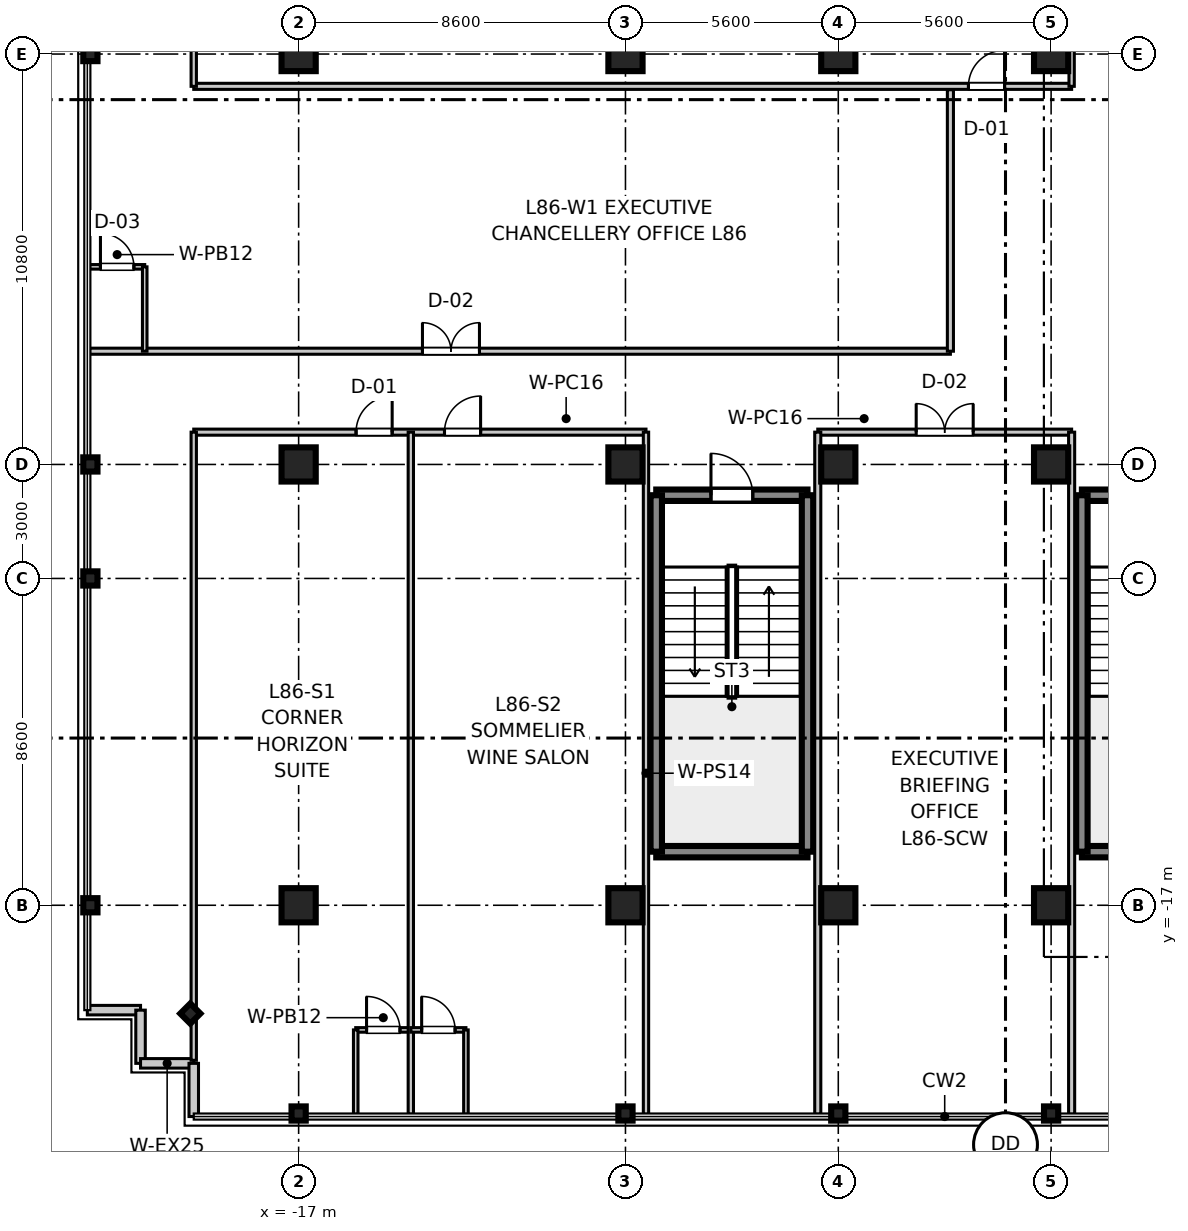
"""IFC4 building model, lengths in metres.
Left out: names, types, materials, properties, quantities, classifications, styles, units other than length and angle.
Written with IfcOpenShell. Run it as: python <this file> out.ifc"""

import sys

from ifc_helpers import new_model, si_unit, direction, frame, frame_2d, origin, origin_2d, place, context, subcontext, project, spatial, rectangle, i_section, extrude, source, transform, mapped, element, fill, save


model = new_model("IFC4")
c1 = context("Model", 3, precision=1e-05, world=origin(), true_north=direction((0.0, 1.0)))
c2 = subcontext(c1, "Body", "Model", "MODEL_VIEW")
j1 = project(units=[si_unit("LENGTHUNIT", "METRE"), si_unit("PLANEANGLEUNIT", "RADIAN")], contexts=[c1])
p1 = place(None, origin())
s1 = spatial("IfcSite", under=j1, at=p1, CompositionType="ELEMENT")
p2 = place(p1, origin())
s2 = spatial("IfcBuilding", under=s1, at=p2, CompositionType="ELEMENT")
p3 = place(p2, frame((0.0, 0.0, 334.75)))
s3 = spatial("IfcBuildingStorey", under=s2, at=p3, CompositionType="ELEMENT", Elevation=334.75)
m1 = source(origin(), c2, "Body", "SweptSolid", [
    extrude(rectangle(XDim=0.9, YDim=0.9, at=origin_2d()), origin(), (0.0, 0.0, 1.0), 3.755),
])
for number, where, z_axis, x_axis in (
    (1, (-17.0, -17.0, 0.0), (0.0, 0.0, 1.0), (1.0, 0.0, 0.0)),
    (2, (-17.0, -5.4, 0.0), (0.0, 0.0, 1.0), (1.0, 0.0, 0.0)),
    (3, (-17.0, 5.4, 0.0), (0.0, 0.0, 1.0), (1.0, 0.0, 0.0)),
    (4, (-8.4, -17.0, 0.0), (0.0, 0.0, 1.0), (1.0, 0.0, 0.0)),
    (5, (-8.4, -5.4, 0.0), (0.0, 0.0, 1.0), (1.0, 0.0, 0.0)),
    (6, (-8.4, 5.4, 0.0), (0.0, 0.0, 1.0), (1.0, 0.0, 0.0)),
    (7, (-2.8, -17.0, 0.0), (0.0, 0.0, 1.0), (1.0, 0.0, 0.0)),
    (8, (-2.8, -5.4, 0.0), (0.0, 0.0, 1.0), (1.0, 0.0, 0.0)),
    (9, (-2.8, 5.4, 0.0), (0.0, 0.0, 1.0), (1.0, 0.0, 0.0)),
    (10, (2.8, -17.0, 0.0), (0.0, 0.0, 1.0), (1.0, 0.0, 0.0)),
    (11, (2.8, -5.4, 0.0), (0.0, 0.0, 1.0), (1.0, 0.0, 0.0)),
    (12, (2.8, 5.4, 0.0), (0.0, 0.0, 1.0), (1.0, 0.0, 0.0)),
):
    element("IfcColumn", number, at=place(p3, frame(where, z_axis=z_axis, x_axis=x_axis)), inside=s3, PredefinedType="COLUMN", context=c2, shape_type="MappedRepresentation", body=[
        mapped(m1, transform((0.0, 0.0, 0.0), scale=1.0)),
    ])
m2 = source(origin(), c2, "Body", "SweptSolid", [
    extrude(i_section(OverallWidth=0.374, OverallDepth=0.374, WebThickness=0.014, FlangeThickness=0.023, at=origin_2d()), origin(), (0.0, 0.0, 1.0), 3.755),
])
for number, where, z_axis, x_axis in (
    (13, (-22.48, -17.0, 0.0), (0.0, 0.0, 1.0), (1.0, 0.0, 0.0)),
    (14, (-22.48, -8.4, 0.0), (0.0, 0.0, 1.0), (1.0, 0.0, 0.0)),
    (15, (-22.48, -5.4, 0.0), (0.0, 0.0, 1.0), (1.0, 0.0, 0.0)),
    (16, (-22.48, 5.4, 0.0), (0.0, 0.0, 1.0), (1.0, 0.0, 0.0)),
    (17, (-17.0, -22.48, 0.0), (0.0, 0.0, 1.0), (0.0, 1.0, 0.0)),
    (18, (-8.4, -22.48, 0.0), (0.0, 0.0, 1.0), (0.0, 1.0, 0.0)),
    (19, (-2.8, -22.48, 0.0), (0.0, 0.0, 1.0), (0.0, 1.0, 0.0)),
    (20, (2.8, -22.48, 0.0), (0.0, 0.0, 1.0), (0.0, 1.0, 0.0)),
    (21, (-19.85, -19.85, 0.0), (0.0, 0.0, 1.0), (0.707, 0.707, 0.0)),
):
    element("IfcColumn", number, at=place(p3, frame(where, z_axis=z_axis, x_axis=x_axis)), inside=s3, PredefinedType="COLUMN", context=c2, shape_type="MappedRepresentation", body=[
        mapped(m2, transform((0.0, 0.0, 0.0), scale=1.0)),
    ])
m3 = source(origin(), c2, "Body", "SweptSolid", [
    extrude(rectangle(XDim=3.98, YDim=0.3, at=frame_2d((1.99, 0.0))), origin(), (0.0, 0.0, 1.0), 3.47),
])
for number, where, z_axis, x_axis in (
    (22, (3.61, -15.59, 0.0), (0.0, 0.0, 1.0), (1.0, 0.0, 0.0)),
    (23, (3.61, -6.21, 0.0), (0.0, 0.0, 1.0), (1.0, 0.0, 0.0)),
):
    element("IfcWall", number, at=place(p3, frame(where, z_axis=z_axis, x_axis=x_axis)), inside=s3, PredefinedType="SHEAR", context=c2, shape_type="MappedRepresentation", body=[
        mapped(m3, transform((0.0, 0.0, 0.0), scale=1.0)),
    ])
m4 = source(origin(), c2, "Body", "SweptSolid", [
    extrude(rectangle(XDim=9.38, YDim=0.3, at=frame_2d((4.69, 0.0))), origin(), (0.0, 0.0, 1.0), 3.47),
])
p4 = place(p3, frame((3.61, -15.59, 0.0), z_axis=(0.0, 0.0, 1.0), x_axis=(0.0, 1.0, 0.0)))
e24 = element("IfcWall", 24, at=p4, inside=s3, PredefinedType="SHEAR", context=c2, shape_type="MappedRepresentation", body=[
    mapped(m4, transform((0.0, 0.0, 0.0), scale=1.0)),
])
p5 = place(p3, frame((-7.59, -15.59, 0.0), z_axis=(0.0, 0.0, 1.0), x_axis=(1.0, 0.0, 0.0)))
e25 = element("IfcWall", 25, at=p5, inside=s3, PredefinedType="SHEAR", context=c2, shape_type="MappedRepresentation", body=[
    mapped(m3, transform((0.0, 0.0, 0.0), scale=1.0)),
])
p6 = place(p3, frame((-7.59, -6.21, 0.0), z_axis=(0.0, 0.0, 1.0), x_axis=(1.0, 0.0, 0.0)))
e26 = element("IfcWall", 26, at=p6, inside=s3, PredefinedType="SHEAR", context=c2, shape_type="MappedRepresentation", body=[
    mapped(m3, transform((0.0, 0.0, 0.0), scale=1.0)),
])
p7 = place(p6, frame((1.44, 0.0, 0.0)))
e27 = element("IfcOpeningElement", 27, at=p7, cuts=e26, PredefinedType="OPENING", context=c2, shape_type="SweptSolid", body=[
    extrude(rectangle(XDim=1.1, YDim=2.15, at=frame_2d((0.55, 1.075))), frame((0.0, 0.16, 0.0), z_axis=(0.0, -1.0, 0.0), x_axis=(1.0, 0.0, 0.0)), (0.0, 0.0, 1.0), 0.32),
])
for number, where, z_axis, x_axis in (
    (28, (-7.59, -15.59, 0.0), (0.0, 0.0, 1.0), (0.0, 1.0, 0.0)),
    (29, (-3.61, -15.59, 0.0), (0.0, 0.0, 1.0), (0.0, 1.0, 0.0)),
):
    element("IfcWall", number, at=place(p3, frame(where, z_axis=z_axis, x_axis=x_axis)), inside=s3, PredefinedType="SHEAR", context=c2, shape_type="MappedRepresentation", body=[
        mapped(m4, transform((0.0, 0.0, 0.0), scale=1.0)),
    ])
m5 = source(origin(), c2, "Body", "SweptSolid", [
    extrude(rectangle(XDim=1.4, YDim=0.25, at=frame_2d((0.7, 0.0))), origin(), (0.0, 0.0, 1.0), 3.47),
])
p8 = place(p3, frame((-22.56, -19.76, 0.0), z_axis=(0.0, 0.0, 1.0), x_axis=(1.0, 0.0, 0.0)))
e30 = element("IfcWall", 30, at=p8, inside=s3, PredefinedType="STANDARD", context=c2, shape_type="MappedRepresentation", body=[
    mapped(m5, transform((0.0, 0.0, 0.0), scale=1.0)),
])
m6 = source(origin(), c2, "Body", "SweptSolid", [
    extrude(rectangle(XDim=1.4, YDim=0.25, at=frame_2d((0.7, 0.0))), origin(), (0.0, 0.0, 1.0), 3.47),
])
for number, where, z_axis, x_axis in (
    (31, (-21.16, -21.16, 0.0), (0.0, 0.0, 1.0), (0.0, 1.0, 0.0)),
    (32, (-21.16, -21.16, 0.0), (0.0, 0.0, 1.0), (1.0, 0.0, 0.0)),
):
    element("IfcWall", number, at=place(p3, frame(where, z_axis=z_axis, x_axis=x_axis)), inside=s3, PredefinedType="STANDARD", context=c2, shape_type="MappedRepresentation", body=[
        mapped(m6, transform((0.0, 0.0, 0.0), scale=1.0)),
    ])
p9 = place(p3, frame((-19.76, -22.56, 0.0), z_axis=(0.0, 0.0, 1.0), x_axis=(0.0, 1.0, 0.0)))
e33 = element("IfcWall", 33, at=p9, inside=s3, PredefinedType="STANDARD", context=c2, shape_type="MappedRepresentation", body=[
    mapped(m5, transform((0.0, 0.0, 0.0), scale=1.0)),
])
m7 = source(origin(), c2, "Body", "SweptSolid", [
    extrude(rectangle(XDim=23.1, YDim=0.16, at=frame_2d((11.55, 0.0))), origin(), (0.0, 0.0, 1.0), 2.81),
])
p10 = place(p3, frame((-19.76, 4.55, 0.0), z_axis=(0.0, 0.0, 1.0), x_axis=(1.0, 0.0, 0.0)))
e34 = element("IfcWall", 34, at=p10, inside=s3, PredefinedType="PARTITIONING", context=c2, shape_type="MappedRepresentation", body=[
    mapped(m7, transform((0.0, 0.0, 0.0), scale=1.0)),
])
p11 = place(p10, frame((20.385, 0.0, 0.0)))
e35 = element("IfcOpeningElement", 35, at=p11, cuts=e34, PredefinedType="OPENING", context=c2, shape_type="SweptSolid", body=[
    extrude(rectangle(XDim=0.95, YDim=2.1, at=frame_2d((0.475, 1.05))), frame((0.0, 0.09, 0.0), z_axis=(0.0, -1.0, 0.0), x_axis=(1.0, 0.0, 0.0)), (0.0, 0.0, 1.0), 0.18),
])
m8 = source(origin(), c2, "Body", "SweptSolid", [
    extrude(rectangle(XDim=16.53, YDim=0.14, at=frame_2d((8.265, 0.0))), origin(), (0.0, 0.0, 1.0), 2.81),
])
p12 = place(p3, frame((-19.76, 4.55, 0.0), z_axis=(0.0, 0.0, 1.0), x_axis=(0.0, 1.0, 0.0)))
e36 = element("IfcWall", 36, at=p12, inside=s3, PredefinedType="PARTITIONING", context=c2, shape_type="MappedRepresentation", body=[
    mapped(m8, transform((0.0, 0.0, 0.0), scale=1.0)),
])
m9 = source(origin(), c2, "Body", "SweptSolid", [
    extrude(rectangle(XDim=17.95, YDim=0.14, at=frame_2d((8.975, 0.0))), origin(), (0.0, 0.0, 1.0), 2.81),
])
p13 = place(p3, frame((3.34, 4.55, 0.0), z_axis=(0.0, 0.0, 1.0), x_axis=(0.0, 1.0, 0.0)))
e37 = element("IfcWall", 37, at=p13, inside=s3, PredefinedType="PARTITIONING", context=c2, shape_type="MappedRepresentation", body=[
    mapped(m9, transform((0.0, 0.0, 0.0), scale=1.0)),
])
m10 = source(origin(), c2, "Body", "SweptSolid", [
    extrude(rectangle(XDim=11.9, YDim=0.16, at=frame_2d((5.95, 0.0))), origin(), (0.0, 0.0, 1.0), 2.81),
])
p14 = place(p3, frame((-19.76, -4.55, 0.0), z_axis=(0.0, 0.0, 1.0), x_axis=(1.0, 0.0, 0.0)))
e38 = element("IfcWall", 38, at=p14, inside=s3, PredefinedType="PARTITIONING", context=c2, shape_type="MappedRepresentation", body=[
    mapped(m10, transform((0.0, 0.0, 0.0), scale=1.0)),
])
p15 = place(p14, frame((4.271, 0.0, 0.0)))
e39 = element("IfcOpeningElement", 39, at=p15, cuts=e38, PredefinedType="OPENING", context=c2, shape_type="SweptSolid", body=[
    extrude(rectangle(XDim=0.95, YDim=2.1, at=frame_2d((0.475, 1.05))), frame((0.0, 0.09, 0.0), z_axis=(0.0, -1.0, 0.0), x_axis=(1.0, 0.0, 0.0)), (0.0, 0.0, 1.0), 0.18),
])
p16 = place(p14, frame((6.598, 0.0, 0.0)))
e40 = element("IfcOpeningElement", 40, at=p16, cuts=e38, PredefinedType="OPENING", context=c2, shape_type="SweptSolid", body=[
    extrude(rectangle(XDim=0.95, YDim=2.1, at=frame_2d((0.475, 1.05))), frame((0.0, 0.09, 0.0), z_axis=(0.0, -1.0, 0.0), x_axis=(1.0, 0.0, 0.0)), (0.0, 0.0, 1.0), 0.18),
])
p17 = place(p3, frame((-19.76, -21.08, 0.0), z_axis=(0.0, 0.0, 1.0), x_axis=(0.0, 1.0, 0.0)))
e41 = element("IfcWall", 41, at=p17, inside=s3, PredefinedType="PARTITIONING", context=c2, shape_type="MappedRepresentation", body=[
    mapped(m8, transform((0.0, 0.0, 0.0), scale=1.0)),
])
p18 = place(p3, frame((-7.86, -22.5, 0.0), z_axis=(0.0, 0.0, 1.0), x_axis=(0.0, 1.0, 0.0)))
e42 = element("IfcWall", 42, at=p18, inside=s3, PredefinedType="PARTITIONING", context=c2, shape_type="MappedRepresentation", body=[
    mapped(m9, transform((0.0, 0.0, 0.0), scale=1.0)),
])
m11 = source(origin(), c2, "Body", "SweptSolid", [
    extrude(rectangle(XDim=1.45, YDim=0.12, at=frame_2d((0.725, 0.0))), origin(), (0.0, 0.0, 1.0), 2.81),
])
p19 = place(p3, frame((-15.498, -20.28, 0.0), z_axis=(0.0, 0.0, 1.0), x_axis=(1.0, 0.0, 0.0)))
e43 = element("IfcWall", 43, at=p19, inside=s3, PredefinedType="PARTITIONING", context=c2, shape_type="MappedRepresentation", body=[
    mapped(m11, transform((0.0, 0.0, 0.0), scale=1.0)),
])
p20 = place(p19, frame((0.285, 0.0, 0.0)))
e44 = element("IfcOpeningElement", 44, at=p20, cuts=e43, PredefinedType="OPENING", context=c2, shape_type="SweptSolid", body=[
    extrude(rectangle(XDim=0.88, YDim=2.1, at=frame_2d((0.44, 1.05))), frame((0.0, 0.07, 0.0), z_axis=(0.0, -1.0, 0.0), x_axis=(1.0, 0.0, 0.0)), (0.0, 0.0, 1.0), 0.14),
])
m12 = source(origin(), c2, "Body", "SweptSolid", [
    extrude(rectangle(XDim=2.22, YDim=0.12, at=frame_2d((1.11, 0.0))), origin(), (0.0, 0.0, 1.0), 2.81),
])
p21 = place(p3, frame((-15.498, -22.5, 0.0), z_axis=(0.0, 0.0, 1.0), x_axis=(0.0, 1.0, 0.0)))
e45 = element("IfcWall", 45, at=p21, inside=s3, PredefinedType="PARTITIONING", context=c2, shape_type="MappedRepresentation", body=[
    mapped(m12, transform((0.0, 0.0, 0.0), scale=1.0)),
])
p22 = place(p3, frame((-14.048, -22.5, 0.0), z_axis=(0.0, 0.0, 1.0), x_axis=(0.0, 1.0, 0.0)))
e46 = element("IfcWall", 46, at=p22, inside=s3, PredefinedType="PARTITIONING", context=c2, shape_type="MappedRepresentation", body=[
    mapped(m9, transform((0.0, 0.0, 0.0), scale=1.0)),
])
m13 = source(origin(), c2, "Body", "SweptSolid", [
    extrude(rectangle(XDim=1.45, YDim=0.12, at=frame_2d((0.725, 0.0))), origin(), (0.0, 0.0, 1.0), 2.81),
])
p23 = place(p3, frame((-14.048, -20.28, 0.0), z_axis=(0.0, 0.0, 1.0), x_axis=(1.0, 0.0, 0.0)))
e47 = element("IfcWall", 47, at=p23, inside=s3, PredefinedType="PARTITIONING", context=c2, shape_type="MappedRepresentation", body=[
    mapped(m13, transform((0.0, 0.0, 0.0), scale=1.0)),
])
p24 = place(p23, frame((0.285, 0.0, 0.0)))
e48 = element("IfcOpeningElement", 48, at=p24, cuts=e47, PredefinedType="OPENING", context=c2, shape_type="SweptSolid", body=[
    extrude(rectangle(XDim=0.88, YDim=2.1, at=frame_2d((0.44, 1.05))), frame((0.0, 0.07, 0.0), z_axis=(0.0, -1.0, 0.0), x_axis=(1.0, 0.0, 0.0)), (0.0, 0.0, 1.0), 0.14),
])
p25 = place(p3, frame((-12.598, -22.5, 0.0), z_axis=(0.0, 0.0, 1.0), x_axis=(0.0, 1.0, 0.0)))
e49 = element("IfcWall", 49, at=p25, inside=s3, PredefinedType="PARTITIONING", context=c2, shape_type="MappedRepresentation", body=[
    mapped(m12, transform((0.0, 0.0, 0.0), scale=1.0)),
])
m14 = source(origin(), c2, "Body", "SweptSolid", [
    extrude(rectangle(XDim=6.68, YDim=0.16, at=frame_2d((3.34, 0.0))), origin(), (0.0, 0.0, 1.0), 2.81),
])
p26 = place(p3, frame((-3.34, -4.55, 0.0), z_axis=(0.0, 0.0, 1.0), x_axis=(1.0, 0.0, 0.0)))
e50 = element("IfcWall", 50, at=p26, inside=s3, PredefinedType="PARTITIONING", context=c2, shape_type="MappedRepresentation", body=[
    mapped(m14, transform((0.0, 0.0, 0.0), scale=1.0)),
])
p27 = place(p26, frame((2.59, 0.0, 0.0)))
e51 = element("IfcOpeningElement", 51, at=p27, cuts=e50, PredefinedType="OPENING", context=c2, shape_type="SweptSolid", body=[
    extrude(rectangle(XDim=1.5, YDim=2.15, at=frame_2d((0.75, 1.075))), frame((0.0, 0.09, 0.0), z_axis=(0.0, -1.0, 0.0), x_axis=(1.0, 0.0, 0.0)), (0.0, 0.0, 1.0), 0.18),
])
m15 = source(origin(), c2, "Body", "SweptSolid", [
    extrude(rectangle(XDim=17.95, YDim=0.16, at=frame_2d((8.975, 0.0))), origin(), (0.0, 0.0, 1.0), 2.81),
])
for number, where, z_axis, x_axis in (
    (52, (-3.34, -22.5, 0.0), (0.0, 0.0, 1.0), (0.0, 1.0, 0.0)),
    (53, (3.34, -22.5, 0.0), (0.0, 0.0, 1.0), (0.0, 1.0, 0.0)),
):
    element("IfcWall", number, at=place(p3, frame(where, z_axis=z_axis, x_axis=x_axis)), inside=s3, PredefinedType="PARTITIONING", context=c2, shape_type="MappedRepresentation", body=[
        mapped(m15, transform((0.0, 0.0, 0.0), scale=1.0)),
    ])
m16 = source(origin(), c2, "Body", "SweptSolid", [
    extrude(rectangle(XDim=22.65, YDim=0.16, at=frame_2d((11.325, 0.0))), origin(), (0.0, 0.0, 1.0), 2.81),
])
p28 = place(p3, frame((-22.5, -2.42, 0.0), z_axis=(0.0, 0.0, 1.0), x_axis=(1.0, 0.0, 0.0)))
e54 = element("IfcWall", 54, at=p28, inside=s3, PredefinedType="PARTITIONING", context=c2, shape_type="MappedRepresentation", body=[
    mapped(m16, transform((0.0, 0.0, 0.0), scale=1.0)),
])
p29 = place(p28, frame((8.758, 0.0, 0.0)))
e55 = element("IfcOpeningElement", 55, at=p29, cuts=e54, PredefinedType="OPENING", context=c2, shape_type="SweptSolid", body=[
    extrude(rectangle(XDim=1.5, YDim=2.15, at=frame_2d((0.75, 1.075))), frame((0.0, 0.09, 0.0), z_axis=(0.0, -1.0, 0.0), x_axis=(1.0, 0.0, 0.0)), (0.0, 0.0, 1.0), 0.18),
])
m17 = source(origin(), c2, "Body", "SweptSolid", [
    extrude(rectangle(XDim=6.88, YDim=0.16, at=frame_2d((3.44, 0.0))), origin(), (0.0, 0.0, 1.0), 2.81),
])
p30 = place(p3, frame((0.15, -2.42, 0.0), z_axis=(0.0, 0.0, 1.0), x_axis=(0.0, 1.0, 0.0)))
e56 = element("IfcWall", 56, at=p30, inside=s3, PredefinedType="PARTITIONING", context=c2, shape_type="MappedRepresentation", body=[
    mapped(m17, transform((0.0, 0.0, 0.0), scale=1.0)),
])
p31 = place(p3, frame((-22.5, -0.2, 0.0), z_axis=(0.0, 0.0, 1.0), x_axis=(1.0, 0.0, 0.0)))
e57 = element("IfcWall", 57, at=p31, inside=s3, PredefinedType="PARTITIONING", context=c2, shape_type="MappedRepresentation", body=[
    mapped(m11, transform((0.0, 0.0, 0.0), scale=1.0)),
])
p32 = place(p31, frame((0.285, 0.0, 0.0)))
e58 = element("IfcOpeningElement", 58, at=p32, cuts=e57, PredefinedType="OPENING", context=c2, shape_type="SweptSolid", body=[
    extrude(rectangle(XDim=0.88, YDim=2.1, at=frame_2d((0.44, 1.05))), frame((0.0, 0.07, 0.0), z_axis=(0.0, -1.0, 0.0), x_axis=(1.0, 0.0, 0.0)), (0.0, 0.0, 1.0), 0.14),
])
p33 = place(p3, frame((-21.05, -2.42, 0.0), z_axis=(0.0, 0.0, 1.0), x_axis=(0.0, 1.0, 0.0)))
e59 = element("IfcWall", 59, at=p33, inside=s3, PredefinedType="PARTITIONING", context=c2, shape_type="MappedRepresentation", body=[
    mapped(m12, transform((0.0, 0.0, 0.0), scale=1.0)),
])
m18 = source(origin(), c2, "Body", "SweptSolid", [
    extrude(rectangle(XDim=1.1, YDim=2.15, at=frame_2d((0.55, 1.075))), frame((0.0, 0.025, 0.0), z_axis=(0.0, -1.0, 0.0), x_axis=(1.0, 0.0, 0.0)), (0.0, 0.0, 1.0), 0.05),
])
p34 = place(p7, frame((1.1, 0.0, 0.0), z_axis=(0.0, 0.0, 1.0), x_axis=(-1.0, 0.0, 0.0)))
e60 = element("IfcDoor", 60, at=p34, inside=s3, OperationType="SINGLE_SWING_LEFT", PredefinedType="DOOR", context=c2, shape_type="MappedRepresentation", body=[
    mapped(m18, transform((0.0, 0.0, 0.0), scale=1.0)),
])
fill(e27, e60)
m19 = source(origin(), c2, "Body", "SweptSolid", [
    extrude(rectangle(XDim=0.95, YDim=2.1, at=frame_2d((0.475, 1.05))), frame((0.0, 0.025, 0.0), z_axis=(0.0, -1.0, 0.0), x_axis=(1.0, 0.0, 0.0)), (0.0, 0.0, 1.0), 0.05),
])
p35 = place(p11, origin())
e61 = element("IfcDoor", 61, at=p35, inside=s3, OperationType="SINGLE_SWING_RIGHT", PredefinedType="DOOR", context=c2, shape_type="MappedRepresentation", body=[
    mapped(m19, transform((0.0, 0.0, 0.0), scale=1.0)),
])
fill(e35, e61)
m20 = source(origin(), c2, "Body", "SweptSolid", [
    extrude(rectangle(XDim=0.88, YDim=2.1, at=frame_2d((0.44, 1.05))), frame((0.0, 0.025, 0.0), z_axis=(0.0, -1.0, 0.0), x_axis=(1.0, 0.0, 0.0)), (0.0, 0.0, 1.0), 0.05),
])
p36 = place(p20, frame((0.88, 0.0, 0.0), z_axis=(0.0, 0.0, 1.0), x_axis=(-1.0, 0.0, 0.0)))
e62 = element("IfcDoor", 62, at=p36, inside=s3, OperationType="SINGLE_SWING_LEFT", PredefinedType="DOOR", context=c2, shape_type="MappedRepresentation", body=[
    mapped(m20, transform((0.0, 0.0, 0.0), scale=1.0)),
])
fill(e44, e62)
p37 = place(p15, frame((0.95, 0.0, 0.0), z_axis=(0.0, 0.0, 1.0), x_axis=(-1.0, 0.0, 0.0)))
e63 = element("IfcDoor", 63, at=p37, inside=s3, OperationType="SINGLE_SWING_RIGHT", PredefinedType="DOOR", context=c2, shape_type="MappedRepresentation", body=[
    mapped(m19, transform((0.0, 0.0, 0.0), scale=1.0)),
])
fill(e39, e63)
p38 = place(p24, frame((0.88, 0.0, 0.0), z_axis=(0.0, 0.0, 1.0), x_axis=(-1.0, 0.0, 0.0)))
e64 = element("IfcDoor", 64, at=p38, inside=s3, OperationType="SINGLE_SWING_LEFT", PredefinedType="DOOR", context=c2, shape_type="MappedRepresentation", body=[
    mapped(m20, transform((0.0, 0.0, 0.0), scale=1.0)),
])
fill(e48, e64)
p39 = place(p16, frame((0.95, 0.0, 0.0), z_axis=(0.0, 0.0, 1.0), x_axis=(-1.0, 0.0, 0.0)))
e65 = element("IfcDoor", 65, at=p39, inside=s3, OperationType="SINGLE_SWING_RIGHT", PredefinedType="DOOR", context=c2, shape_type="MappedRepresentation", body=[
    mapped(m19, transform((0.0, 0.0, 0.0), scale=1.0)),
])
fill(e40, e65)
m21 = source(origin(), c2, "Body", "SweptSolid", [
    extrude(rectangle(XDim=1.5, YDim=2.15, at=frame_2d((0.75, 1.075))), frame((0.0, 0.025, 0.0), z_axis=(0.0, -1.0, 0.0), x_axis=(1.0, 0.0, 0.0)), (0.0, 0.0, 1.0), 0.05),
])
p40 = place(p27, frame((1.5, 0.0, 0.0), z_axis=(0.0, 0.0, 1.0), x_axis=(-1.0, 0.0, 0.0)))
e66 = element("IfcDoor", 66, at=p40, inside=s3, OperationType="DOUBLE_DOOR_SINGLE_SWING", PredefinedType="DOOR", context=c2, shape_type="MappedRepresentation", body=[
    mapped(m21, transform((0.0, 0.0, 0.0), scale=1.0)),
])
fill(e51, e66)
p41 = place(p32, frame((0.88, 0.0, 0.0), z_axis=(0.0, 0.0, 1.0), x_axis=(-1.0, 0.0, 0.0)))
e67 = element("IfcDoor", 67, at=p41, inside=s3, OperationType="SINGLE_SWING_LEFT", PredefinedType="DOOR", context=c2, shape_type="MappedRepresentation", body=[
    mapped(m20, transform((0.0, 0.0, 0.0), scale=1.0)),
])
fill(e58, e67)
p42 = place(p29, frame((1.5, 0.0, 0.0), z_axis=(0.0, 0.0, 1.0), x_axis=(-1.0, 0.0, 0.0)))
e68 = element("IfcDoor", 68, at=p42, inside=s3, OperationType="DOUBLE_DOOR_SINGLE_SWING", PredefinedType="DOOR", context=c2, shape_type="MappedRepresentation", body=[
    mapped(m21, transform((0.0, 0.0, 0.0), scale=1.0)),
])
fill(e55, e68)
save(model, sys.argv[1])
